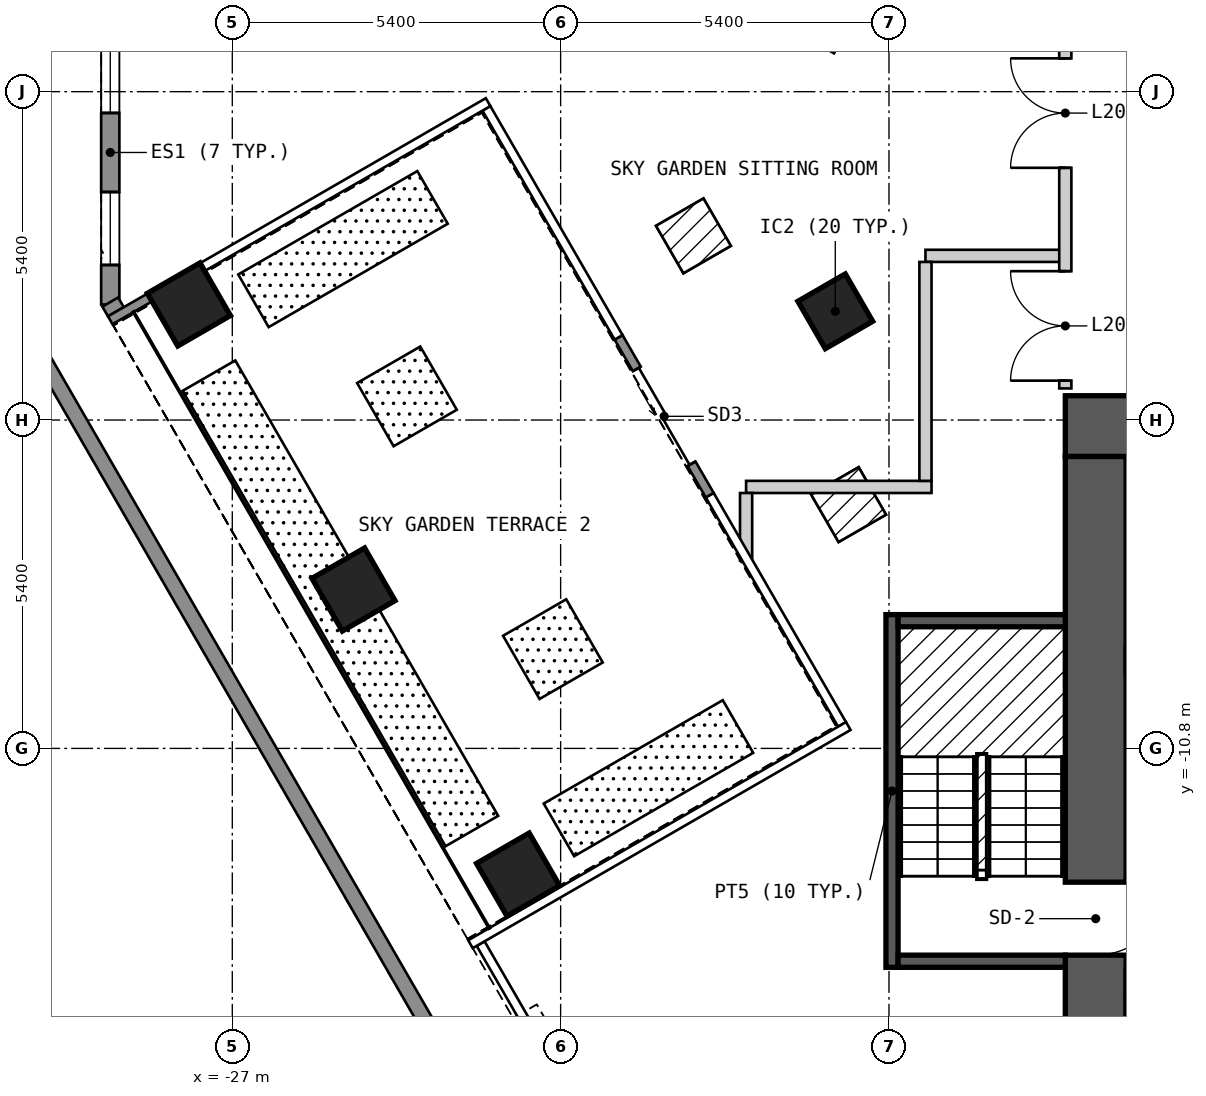
"""IFC4 building model, lengths in metres.
Left out: names, types, materials, properties, quantities, classifications, styles, units other than length and angle.
Written with IfcOpenShell. Run it as: python <this file> out.ifc"""

import sys

from ifc_helpers import new_model, si_unit, direction, frame, frame_2d, origin, origin_2d, place, context, subcontext, project, spatial, polyline, rectangle, outline, extrude, element, fill, save


model = new_model("IFC4")
c1 = context("Model", 3, precision=1e-05, world=origin(), true_north=direction((0.0, 1.0)))
c2 = subcontext(c1, "Body", "Model", "MODEL_VIEW")
j1 = project(units=[si_unit("LENGTHUNIT", "METRE"), si_unit("PLANEANGLEUNIT", "RADIAN")], contexts=[c1])
p1 = place(None, origin())
s1 = spatial("IfcSite", under=j1, at=p1, CompositionType="ELEMENT")
p2 = place(p1, origin())
s2 = spatial("IfcBuilding", under=s1, at=p2, CompositionType="ELEMENT")
p3 = place(p2, frame((0.0, 0.0, 66.0)))
s3 = spatial("IfcBuildingStorey", under=s2, at=p3, CompositionType="ELEMENT", Elevation=66.0)
for number, where, z_axis, x_axis in (
    (1, (-27.714, -3.499, 0.0), (0.0, 0.0, 1.0), (0.5, -0.866, 0.0)),
    (2, (-25.007, -8.187, 0.0), (0.0, 0.0, 1.0), (0.5, -0.866, 0.0)),
    (3, (-22.3, -12.875, 0.0), (0.0, 0.0, 1.0), (0.5, -0.866, 0.0)),
):
    element("IfcColumn", number, at=place(p3, frame(where, z_axis=z_axis, x_axis=x_axis)), inside=s3, PredefinedType="COLUMN", context=c2, shape_type="SweptSolid", body=[
        extrude(rectangle(XDim=1.0, YDim=1.0, at=origin_2d()), origin(), (0.0, 0.0, 1.0), 6.0),
    ])
p4 = place(p3, frame((-17.083, -3.612, 0.0), z_axis=(0.0, 0.0, 1.0), x_axis=(0.5, -0.866025403784, 0.0)))
e4 = element("IfcColumn", 4, at=p4, inside=s3, PredefinedType="COLUMN", context=c2, shape_type="SweptSolid", body=[
    extrude(rectangle(XDim=0.9, YDim=0.9, at=origin_2d()), origin(), (0.0, 0.0, 1.0), 6.0),
])
p5 = place(p3, frame((-13.3, -5.5, 0.0), z_axis=(0.0, 0.0, 1.0), x_axis=(1.0, 0.0, 0.0)))
e5 = element("IfcWall", 5, at=p5, inside=s3, PredefinedType="SHEAR", context=c2, shape_type="SweptSolid", body=[
    extrude(rectangle(XDim=26.6, YDim=1.0, at=frame_2d((13.3, 0.0))), origin(), (0.0, 0.0, 1.0), 5.7),
])
p6 = place(p5, frame((23.65, 0.0, 0.0)))
e6 = element("IfcOpeningElement", 6, at=p6, cuts=e5, PredefinedType="OPENING", context=c2, shape_type="SweptSolid", body=[
    extrude(rectangle(XDim=1.2, YDim=2.1, at=frame_2d((0.6, 1.05))), frame((0.0, 0.51, 0.0), z_axis=(0.0, -1.0, 0.0), x_axis=(1.0, 0.0, 0.0)), (0.0, 0.0, 1.0), 1.02),
])
p7 = place(p3, frame((-12.8, -18.0, 0.0), z_axis=(0.0, 0.0, 1.0), x_axis=(0.0, 1.0, 0.0)))
e7 = element("IfcWall", 7, at=p7, inside=s3, PredefinedType="SHEAR", context=c2, shape_type="SweptSolid", body=[
    extrude(rectangle(XDim=12.0, YDim=1.0, at=frame_2d((6.0, 0.0))), origin(), (0.0, 0.0, 1.0), 5.7),
])
p8 = place(p7, frame((3.8, 0.0, 0.0)))
e8 = element("IfcOpeningElement", 8, at=p8, cuts=e7, PredefinedType="OPENING", context=c2, shape_type="SweptSolid", body=[
    extrude(rectangle(XDim=1.2, YDim=2.1, at=frame_2d((0.6, 1.05))), frame((0.0, 0.51, 0.0), z_axis=(0.0, -1.0, 0.0), x_axis=(1.0, 0.0, 0.0)), (0.0, 0.0, 1.0), 1.02),
])
p9 = place(p3, frame((-29.007, 1.5, 0.0), z_axis=(0.0, 0.0, 1.0), x_axis=(0.0, -1.0, 0.0)))
e9 = element("IfcWall", 9, at=p9, inside=s3, PredefinedType="SOLIDWALL", context=c2, shape_type="SweptSolid", body=[
    extrude(outline(polyline([(0.0, -0.15), (5.0, -0.15), (4.92, 0.15), (0.08, 0.15), (0.0, -0.15)])), origin(), (0.0, 0.0, 1.0), 5.7),
])
p10 = place(p9, frame((0.65, 0.0, 0.15)))
e10 = element("IfcOpeningElement", 10, at=p10, cuts=e9, PredefinedType="OPENING", context=c2, shape_type="SweptSolid", body=[
    extrude(rectangle(XDim=1.2, YDim=2.1, at=frame_2d((0.6, 1.05))), frame((0.0, 0.16, 0.0), z_axis=(0.0, -1.0, 0.0), x_axis=(1.0, 0.0, 0.0)), (0.0, 0.0, 1.0), 0.32),
])
p11 = place(p9, frame((3.15, 0.0, 0.15)))
e11 = element("IfcOpeningElement", 11, at=p11, cuts=e9, PredefinedType="OPENING", context=c2, shape_type="SweptSolid", body=[
    extrude(rectangle(XDim=1.2, YDim=2.1, at=frame_2d((0.6, 1.05))), frame((0.0, 0.16, 0.0), z_axis=(0.0, -1.0, 0.0), x_axis=(1.0, 0.0, 0.0)), (0.0, 0.0, 1.0), 0.32),
])
p12 = place(p3, frame((-29.007, -3.46, 0.0), z_axis=(0.0, 0.0, 1.0), x_axis=(0.505106950785, -0.863056758428, 0.0)))
e12 = element("IfcWall", 12, at=p12, inside=s3, PredefinedType="SOLIDWALL", context=c2, shape_type="SweptSolid", body=[
    extrude(rectangle(XDim=0.184, YDim=0.3, at=frame_2d((0.092, 0.0))), origin(), (0.0, 0.0, 1.0), 5.7),
])
p13 = place(p3, frame((-20.647, -4.04, 0.0), z_axis=(0.0, 0.0, 1.0), x_axis=(0.50002537861, -0.866010750942, 0.0)))
e13 = element("IfcWall", 13, at=p13, inside=s3, PredefinedType="SOLIDWALL", context=c2, shape_type="SweptSolid", body=[
    extrude(rectangle(XDim=3.0, YDim=0.15, at=frame_2d((1.5, 0.0))), origin(), (0.0, 0.0, 1.0), 5.7),
])
p14 = place(p13, frame((0.6, 0.0, 0.0)))
e14 = element("IfcOpeningElement", 14, at=p14, cuts=e13, PredefinedType="OPENING", context=c2, shape_type="SweptSolid", body=[
    extrude(rectangle(XDim=1.8, YDim=2.4, at=frame_2d((0.9, 1.2))), frame((0.0, 0.085, 0.0), z_axis=(0.0, -1.0, 0.0), x_axis=(1.0, 0.0, 0.0)), (0.0, 0.0, 1.0), 0.17),
])
p15 = place(p3, frame((-29.007, -3.759, 0.0), z_axis=(0.0, 0.0, 1.0), x_axis=(0.866218334262, 0.499665685623, 0.0)))
e15 = element("IfcWall", 15, at=p15, inside=s3, PredefinedType="SOLIDWALL", context=c2, shape_type="SweptSolid", body=[
    extrude(rectangle(XDim=0.745, YDim=0.15, at=frame_2d((0.372, 0.0))), origin(), (0.0, 0.0, 1.0), 5.7),
])
p16 = place(p3, frame((-17.731, -25.837, 0.0), z_axis=(0.0, 0.0, 1.0), x_axis=(-0.500044695558, 0.865999597254, 0.0)))
e16 = element("IfcWall", 16, at=p16, inside=s3, PredefinedType="PARAPET", context=c2, shape_type="SweptSolid", body=[
    extrude(outline(polyline([(0.067, -0.125), (26.953, -0.125), (27.02, 0.125), (0.0, 0.125), (0.067, -0.125)])), origin(), (0.0, 0.0, 1.0), 1.6),
])
p17 = place(p3, frame((-18.55, -6.5, 0.0), z_axis=(0.0, 0.0, 1.0), x_axis=(1.0, 0.0, 0.0)))
e17 = element("IfcWall", 17, at=p17, inside=s3, PredefinedType="PARTITIONING", context=c2, shape_type="SweptSolid", body=[
    extrude(rectangle(XDim=3.05, YDim=0.2, at=frame_2d((1.525, 0.0))), origin(), (0.0, 0.0, 1.0), 5.7),
])
p18 = place(p3, frame((-15.6, -2.7, 0.0), z_axis=(0.0, 0.0, 1.0), x_axis=(1.0, 0.0, 0.0)))
e18 = element("IfcWall", 18, at=p18, inside=s3, PredefinedType="PARTITIONING", context=c2, shape_type="SweptSolid", body=[
    extrude(rectangle(XDim=2.3, YDim=0.2, at=frame_2d((1.15, 0.0))), origin(), (0.0, 0.0, 1.0), 5.7),
])
p19 = place(p3, frame((-18.55, -7.711, 0.0), z_axis=(0.0, 0.0, 1.0), x_axis=(0.0, 1.0, 0.0)))
e19 = element("IfcWall", 19, at=p19, inside=s3, PredefinedType="PARTITIONING", context=c2, shape_type="SweptSolid", body=[
    extrude(rectangle(XDim=1.111, YDim=0.2, at=frame_2d((0.555, 0.0))), origin(), (0.0, 0.0, 1.0), 5.7),
])
p20 = place(p3, frame((-15.6, -6.4, 0.0), z_axis=(0.0, 0.0, 1.0), x_axis=(0.0, 1.0, 0.0)))
e20 = element("IfcWall", 20, at=p20, inside=s3, PredefinedType="PARTITIONING", context=c2, shape_type="SweptSolid", body=[
    extrude(rectangle(XDim=3.6, YDim=0.2, at=frame_2d((1.8, 0.0))), origin(), (0.0, 0.0, 1.0), 5.7),
])
p21 = place(p3, frame((-13.3, -4.88, 0.0), z_axis=(0.0, 0.0, 1.0), x_axis=(0.0, 1.0, 0.0)))
e21 = element("IfcWall", 21, at=p21, inside=s3, PredefinedType="PARTITIONING", context=c2, shape_type="SweptSolid", body=[
    extrude(rectangle(XDim=6.78, YDim=0.2, at=frame_2d((3.39, 0.0))), origin(), (0.0, 0.0, 1.0), 5.7),
])
p22 = place(p21, frame((3.628, 0.0, 0.0)))
e22 = element("IfcOpeningElement", 22, at=p22, cuts=e21, PredefinedType="OPENING", context=c2, shape_type="SweptSolid", body=[
    extrude(rectangle(XDim=1.8, YDim=2.1, at=frame_2d((0.9, 1.05))), frame((0.0, 0.11, 0.0), z_axis=(0.0, -1.0, 0.0), x_axis=(1.0, 0.0, 0.0)), (0.0, 0.0, 1.0), 0.22),
])
p23 = place(p21, frame((0.128, 0.0, 0.0)))
e23 = element("IfcOpeningElement", 23, at=p23, cuts=e21, PredefinedType="OPENING", context=c2, shape_type="SweptSolid", body=[
    extrude(rectangle(XDim=1.8, YDim=2.1, at=frame_2d((0.9, 1.05))), frame((0.0, 0.11, 0.0), z_axis=(0.0, -1.0, 0.0), x_axis=(1.0, 0.0, 0.0)), (0.0, 0.0, 1.0), 0.22),
])
p24 = place(p3, frame((-16.15, -14.4, 0.0), z_axis=(0.0, 0.0, 1.0), x_axis=(0.0, 1.0, 0.0)))
e24 = element("IfcWall", 24, at=p24, inside=s3, PredefinedType="SOLIDWALL", context=c2, shape_type="SweptSolid", body=[
    extrude(rectangle(XDim=5.8, YDim=0.2, at=frame_2d((2.9, 0.0))), origin(), (0.0, 0.0, 1.0), 5.7),
])
for number, where, z_axis, x_axis in (
    (25, (-16.05, -14.3, 0.0), (0.0, 0.0, 1.0), (1.0, 0.0, 0.0)),
    (26, (-16.05, -8.7, 0.0), (0.0, 0.0, 1.0), (1.0, 0.0, 0.0)),
):
    element("IfcWall", number, at=place(p3, frame(where, z_axis=z_axis, x_axis=x_axis)), inside=s3, PredefinedType="SOLIDWALL", context=c2, shape_type="SweptSolid", body=[
        extrude(rectangle(XDim=2.75, YDim=0.2, at=frame_2d((1.375, 0.0))), origin(), (0.0, 0.0, 1.0), 5.7),
    ])
p25 = place(p10, origin())
e27 = element("IfcWindow", 27, at=p25, inside=s3, PartitioningType="SINGLE_PANEL", PredefinedType="WINDOW", context=c2, shape_type="SweptSolid", body=[
    extrude(rectangle(XDim=1.2, YDim=2.1, at=frame_2d((0.6, 1.05))), frame((0.0, 0.03, 0.0), z_axis=(0.0, -1.0, 0.0), x_axis=(1.0, 0.0, 0.0)), (0.0, 0.0, 1.0), 0.06),
])
fill(e10, e27)
p26 = place(p11, origin())
e28 = element("IfcWindow", 28, at=p26, inside=s3, PartitioningType="SINGLE_PANEL", PredefinedType="WINDOW", context=c2, shape_type="SweptSolid", body=[
    extrude(rectangle(XDim=1.2, YDim=2.1, at=frame_2d((0.6, 1.05))), frame((0.0, 0.03, 0.0), z_axis=(0.0, -1.0, 0.0), x_axis=(1.0, 0.0, 0.0)), (0.0, 0.0, 1.0), 0.06),
])
fill(e11, e28)
p27 = place(p14, origin())
e29 = element("IfcDoor", 29, at=p27, inside=s3, OperationType="SLIDING_TO_LEFT", PredefinedType="DOOR", context=c2, shape_type="SweptSolid", body=[
    extrude(rectangle(XDim=1.8, YDim=2.4, at=frame_2d((0.9, 1.2))), frame((0.0, 0.025, 0.0), z_axis=(0.0, -1.0, 0.0), x_axis=(1.0, 0.0, 0.0)), (0.0, 0.0, 1.0), 0.05),
])
fill(e14, e29)
p28 = place(p22, origin())
e30 = element("IfcDoor", 30, at=p28, inside=s3, OperationType="DOUBLE_DOOR_SINGLE_SWING", PredefinedType="DOOR", context=c2, shape_type="SweptSolid", body=[
    extrude(rectangle(XDim=1.8, YDim=2.1, at=frame_2d((0.9, 1.05))), frame((0.0, 0.025, 0.0), z_axis=(0.0, -1.0, 0.0), x_axis=(1.0, 0.0, 0.0)), (0.0, 0.0, 1.0), 0.05),
])
fill(e22, e30)
p29 = place(p23, origin())
e31 = element("IfcDoor", 31, at=p29, inside=s3, OperationType="DOUBLE_DOOR_SINGLE_SWING", PredefinedType="DOOR", context=c2, shape_type="SweptSolid", body=[
    extrude(rectangle(XDim=1.8, YDim=2.1, at=frame_2d((0.9, 1.05))), frame((0.0, 0.025, 0.0), z_axis=(0.0, -1.0, 0.0), x_axis=(1.0, 0.0, 0.0)), (0.0, 0.0, 1.0), 0.05),
])
fill(e23, e31)
p30 = place(p8, origin())
e32 = element("IfcDoor", 32, at=p30, inside=s3, OperationType="SINGLE_SWING_RIGHT", PredefinedType="DOOR", context=c2, shape_type="SweptSolid", body=[
    extrude(rectangle(XDim=1.2, YDim=2.1, at=frame_2d((0.6, 1.05))), frame((0.0, 0.025, 0.0), z_axis=(0.0, -1.0, 0.0), x_axis=(1.0, 0.0, 0.0)), (0.0, 0.0, 1.0), 0.05),
])
fill(e8, e32)
save(model, sys.argv[1])
